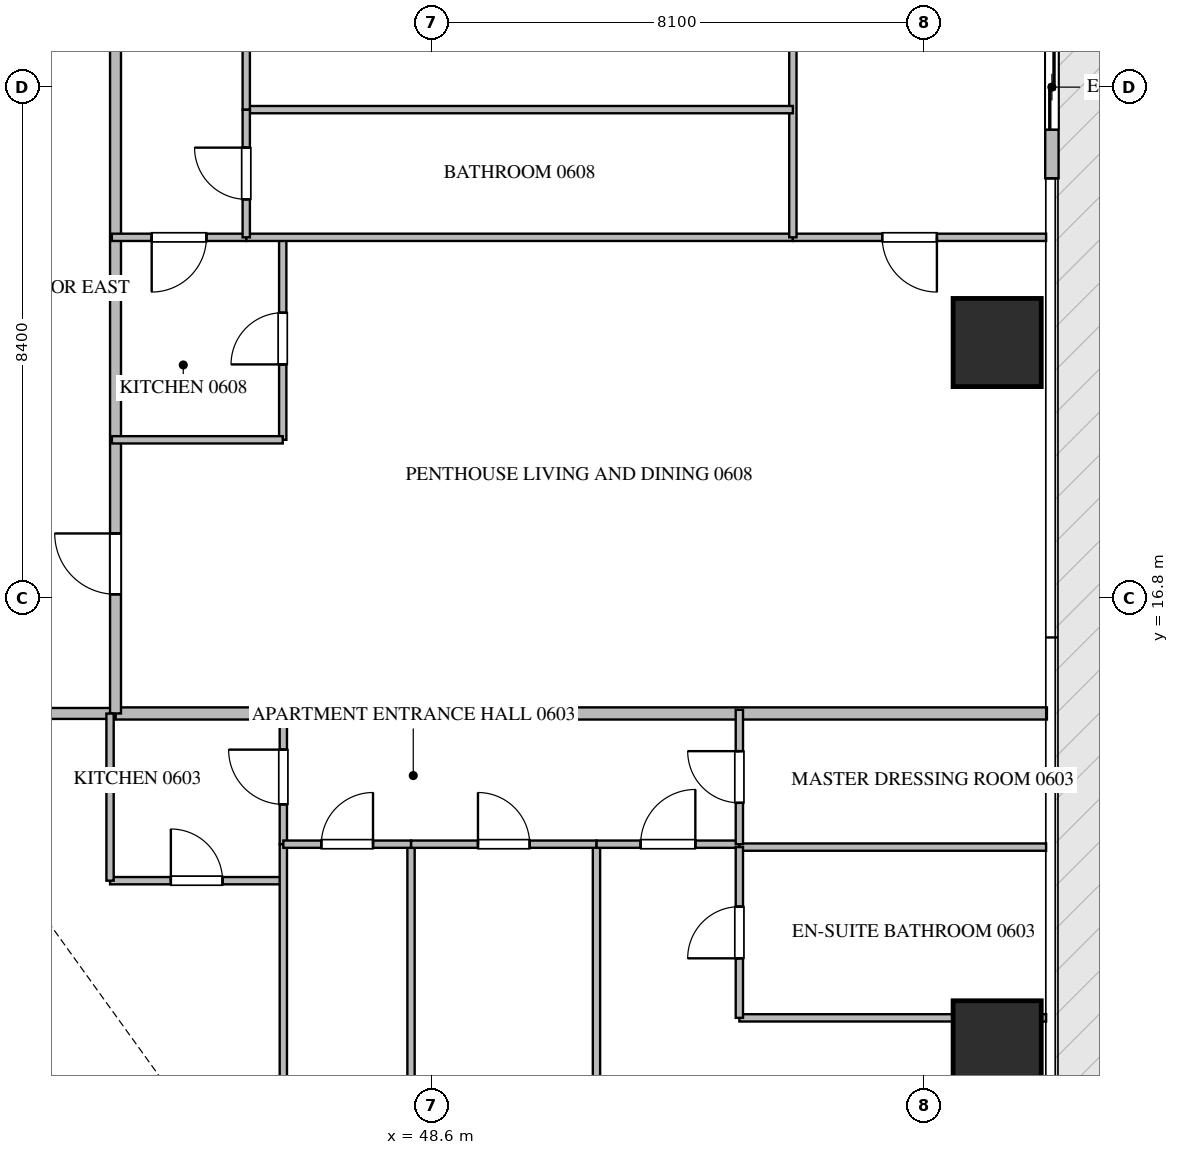
"""IFC4 building model, lengths in metres.
Left out: names, types, materials, properties, quantities, classifications, styles, units other than length and angle.
Written with IfcOpenShell. Run it as: python <this file> out.ifc"""

import sys

from ifc_helpers import new_model, si_unit, direction, frame, frame_2d, origin, origin_2d, place, context, subcontext, project, spatial, rectangle, extrude, source, transform, mapped, element, fill, save


model = new_model("IFC4")
c1 = context("Model", 3, precision=1e-05, world=origin(), true_north=direction((0.0, 1.0)))
c2 = subcontext(c1, "Body", "Model", "MODEL_VIEW")
j1 = project(units=[si_unit("LENGTHUNIT", "METRE"), si_unit("PLANEANGLEUNIT", "RADIAN")], contexts=[c1])
p1 = place(None, origin())
s1 = spatial("IfcSite", under=j1, at=p1, CompositionType="ELEMENT")
p2 = place(p1, origin())
s2 = spatial("IfcBuilding", under=s1, at=p2, CompositionType="ELEMENT")
p3 = place(p2, frame((0.0, 0.0, 30.45)))
s3 = spatial("IfcBuildingStorey", under=s2, at=p3, CompositionType="ELEMENT", Elevation=30.45)
m1 = source(origin(), c2, "Body", "SweptSolid", [
    extrude(rectangle(XDim=1.45, YDim=1.45, at=origin_2d()), origin(), (0.0, 0.0, 1.0), 3.75),
])
for number, where, z_axis, x_axis in (
    (1, (57.9, 9.45, -0.26), (0.0, 0.0, 1.0), (1.0, 0.0, 0.0)),
    (2, (57.9, 21.0, -0.26), (0.0, 0.0, 1.0), (1.0, 0.0, 0.0)),
):
    element("IfcColumn", number, at=place(p3, frame(where, z_axis=z_axis, x_axis=x_axis)), inside=s3, PredefinedType="COLUMN", context=c2, shape_type="MappedRepresentation", body=[
        mapped(m1, transform((0.0, 0.0, 0.0), scale=1.0)),
    ])
p4 = place(p3, frame((58.8, 23.7, 0.0), z_axis=(0.0, 0.0, 1.0), x_axis=(0.0, 1.0, 0.0)))
e3 = element("IfcWall", 3, at=p4, inside=s3, PredefinedType="ELEMENTEDWALL", context=c2, shape_type="SweptSolid", body=[
    extrude(rectangle(XDim=3.0, YDim=0.22, at=frame_2d((1.5, 0.0))), origin(), (0.0, 0.0, 1.0), 3.475),
])
p5 = place(p4, frame((0.8, 0.0, 0.0)))
e4 = element("IfcOpeningElement", 4, at=p5, cuts=e3, PredefinedType="OPENING", context=c2, shape_type="SweptSolid", body=[
    extrude(rectangle(XDim=1.4, YDim=2.25, at=frame_2d((0.7, 1.125))), frame((0.0, 0.12, 0.0), z_axis=(0.0, -1.0, 0.0), x_axis=(1.0, 0.0, 0.0)), (0.0, 0.0, 1.0), 0.24),
])
p6 = place(p3, frame((43.4, 14.9, 0.0), z_axis=(0.0, 0.0, 1.0), x_axis=(1.0, 0.0, 0.0)))
e5 = element("IfcWall", 5, at=p6, inside=s3, PredefinedType="PARTITIONING", context=c2, shape_type="SweptSolid", body=[
    extrude(rectangle(XDim=15.318, YDim=0.2, at=frame_2d((7.659, 0.0))), origin(), (0.0, 0.0, 1.0), 3.49),
])
p7 = place(p3, frame((21.402, 14.9, 0.0), z_axis=(0.0, 0.0, 1.0), x_axis=(1.0, 0.0, 0.0)))
e6 = element("IfcWall", 6, at=p7, inside=s3, PredefinedType="PARTITIONING", context=c2, shape_type="SweptSolid", body=[
    extrude(rectangle(XDim=21.996, YDim=0.18, at=frame_2d((10.998, 0.0))), origin(), (0.0, 0.0, 1.0), 3.49),
])
p8 = place(p7, frame((2.1, 0.0, 0.0)))
e7 = element("IfcOpeningElement", 7, at=p8, cuts=e6, PredefinedType="OPENING", context=c2, shape_type="SweptSolid", body=[
    extrude(rectangle(XDim=1.0, YDim=2.15, at=frame_2d((0.5, 1.075))), frame((0.0, 0.1, 0.0), z_axis=(0.0, -1.0, 0.0), x_axis=(1.0, 0.0, 0.0)), (0.0, 0.0, 1.0), 0.2),
])
p9 = place(p7, frame((6.719, 0.0, 0.0)))
e8 = element("IfcOpeningElement", 8, at=p9, cuts=e6, PredefinedType="OPENING", context=c2, shape_type="SweptSolid", body=[
    extrude(rectangle(XDim=1.0, YDim=2.15, at=frame_2d((0.5, 1.075))), frame((0.0, 0.1, 0.0), z_axis=(0.0, -1.0, 0.0), x_axis=(1.0, 0.0, 0.0)), (0.0, 0.0, 1.0), 0.2),
])
p10 = place(p7, frame((18.896, 0.0, 0.0)))
e9 = element("IfcOpeningElement", 9, at=p10, cuts=e6, PredefinedType="OPENING", context=c2, shape_type="SweptSolid", body=[
    extrude(rectangle(XDim=1.0, YDim=2.15, at=frame_2d((0.5, 1.075))), frame((0.0, 0.1, 0.0), z_axis=(0.0, -1.0, 0.0), x_axis=(1.0, 0.0, 0.0)), (0.0, 0.0, 1.0), 0.2),
])
p11 = place(p3, frame((43.4, 14.9, 0.0), z_axis=(0.0, 0.0, 1.0), x_axis=(0.0, 1.0, 0.0)))
e10 = element("IfcWall", 10, at=p11, inside=s3, PredefinedType="PARTITIONING", context=c2, shape_type="SweptSolid", body=[
    extrude(rectangle(XDim=20.6, YDim=0.18, at=frame_2d((10.3, 0.0))), origin(), (0.0, 0.0, 1.0), 3.49),
])
p12 = place(p11, frame((1.96, 0.0, 0.0)))
e11 = element("IfcOpeningElement", 11, at=p12, cuts=e10, PredefinedType="OPENING", context=c2, shape_type="SweptSolid", body=[
    extrude(rectangle(XDim=1.0, YDim=2.15, at=frame_2d((0.5, 1.075))), frame((0.0, 0.1, 0.0), z_axis=(0.0, -1.0, 0.0), x_axis=(1.0, 0.0, 0.0)), (0.0, 0.0, 1.0), 0.2),
])
p13 = place(p3, frame((43.31, 12.15, 0.0), z_axis=(0.0, 0.0, 1.0), x_axis=(1.0, 0.0, 0.0)))
e12 = element("IfcWall", 12, at=p13, inside=s3, PredefinedType="PARTITIONING", context=c2, shape_type="SweptSolid", body=[
    extrude(rectangle(XDim=2.85, YDim=0.12, at=frame_2d((1.425, 0.0))), origin(), (0.0, 0.0, 1.0), 3.49),
])
p14 = place(p13, frame((1.0, 0.0, 0.0)))
e13 = element("IfcOpeningElement", 13, at=p14, cuts=e12, PredefinedType="OPENING", context=c2, shape_type="SweptSolid", body=[
    extrude(rectangle(XDim=0.85, YDim=2.1, at=frame_2d((0.425, 1.05))), frame((0.0, 0.07, 0.0), z_axis=(0.0, -1.0, 0.0), x_axis=(1.0, 0.0, 0.0)), (0.0, 0.0, 1.0), 0.14),
])
p15 = place(p3, frame((43.31, 12.15, 0.0), z_axis=(0.0, 0.0, 1.0), x_axis=(0.0, 1.0, 0.0)))
e14 = element("IfcWall", 14, at=p15, inside=s3, PredefinedType="PARTITIONING", context=c2, shape_type="SweptSolid", body=[
    extrude(rectangle(XDim=2.748, YDim=0.12, at=frame_2d((1.374, 0.0))), origin(), (0.0, 0.0, 1.0), 3.49),
])
p16 = place(p3, frame((46.16, 12.75, 0.0), z_axis=(0.0, 0.0, 1.0), x_axis=(0.0, 1.0, 0.0)))
e15 = element("IfcWall", 15, at=p16, inside=s3, PredefinedType="PARTITIONING", context=c2, shape_type="SweptSolid", body=[
    extrude(rectangle(XDim=2.21, YDim=0.12, at=frame_2d((1.105, 0.0))), origin(), (0.0, 0.0, 1.0), 3.49),
])
p17 = place(p16, frame((0.655, 0.0, 0.0)))
e16 = element("IfcOpeningElement", 16, at=p17, cuts=e15, PredefinedType="OPENING", context=c2, shape_type="SweptSolid", body=[
    extrude(rectangle(XDim=0.9, YDim=2.1, at=frame_2d((0.45, 1.05))), frame((0.0, 0.07, 0.0), z_axis=(0.0, -1.0, 0.0), x_axis=(1.0, 0.0, 0.0)), (0.0, 0.0, 1.0), 0.14),
])
p18 = place(p3, frame((46.16, 4.99, 0.0), z_axis=(0.0, 0.0, 1.0), x_axis=(0.0, 1.0, 0.0)))
e17 = element("IfcWall", 17, at=p18, inside=s3, PredefinedType="PARTITIONING", context=c2, shape_type="SweptSolid", body=[
    extrude(rectangle(XDim=7.758, YDim=0.12, at=frame_2d((3.879, 0.0))), origin(), (0.0, 0.0, 1.0), 3.49),
])
p19 = place(p3, frame((51.31, 4.495, 0.0), z_axis=(0.0, 0.0, 1.0), x_axis=(0.0, 1.0, 0.0)))
e18 = element("IfcWall", 18, at=p19, inside=s3, PredefinedType="PARTITIONING", context=c2, shape_type="SweptSolid", body=[
    extrude(rectangle(XDim=8.255, YDim=0.12, at=frame_2d((4.127, 0.0))), origin(), (0.0, 0.0, 1.0), 3.49),
])
p20 = place(p3, frame((48.26, 4.988, 0.0), z_axis=(0.0, 0.0, 1.0), x_axis=(0.0, 1.0, 0.0)))
e19 = element("IfcWall", 19, at=p20, inside=s3, PredefinedType="PARTITIONING", context=c2, shape_type="SweptSolid", body=[
    extrude(rectangle(XDim=7.762, YDim=0.12, at=frame_2d((3.881, 0.0))), origin(), (0.0, 0.0, 1.0), 3.49),
])
p21 = place(p3, frame((46.16, 12.75, 0.0), z_axis=(0.0, 0.0, 1.0), x_axis=(1.0, 0.0, 0.0)))
e20 = element("IfcWall", 20, at=p21, inside=s3, PredefinedType="PARTITIONING", context=c2, shape_type="SweptSolid", body=[
    extrude(rectangle(XDim=2.1, YDim=0.12, at=frame_2d((1.05, 0.0))), origin(), (0.0, 0.0, 1.0), 3.49),
])
p22 = place(p21, frame((0.625, 0.0, 0.0)))
e21 = element("IfcOpeningElement", 21, at=p22, cuts=e20, PredefinedType="OPENING", context=c2, shape_type="SweptSolid", body=[
    extrude(rectangle(XDim=0.85, YDim=2.1, at=frame_2d((0.425, 1.05))), frame((0.0, 0.07, 0.0), z_axis=(0.0, -1.0, 0.0), x_axis=(1.0, 0.0, 0.0)), (0.0, 0.0, 1.0), 0.14),
])
p23 = place(p3, frame((48.262, 12.75, 0.0), z_axis=(0.0, 0.0, 1.0), x_axis=(1.0, 0.0, 0.0)))
e22 = element("IfcWall", 22, at=p23, inside=s3, PredefinedType="PARTITIONING", context=c2, shape_type="SweptSolid", body=[
    extrude(rectangle(XDim=3.048, YDim=0.12, at=frame_2d((1.524, 0.0))), origin(), (0.0, 0.0, 1.0), 3.49),
])
p24 = place(p23, frame((1.099, 0.0, 0.0)))
e23 = element("IfcOpeningElement", 23, at=p24, cuts=e22, PredefinedType="OPENING", context=c2, shape_type="SweptSolid", body=[
    extrude(rectangle(XDim=0.85, YDim=2.1, at=frame_2d((0.425, 1.05))), frame((0.0, 0.07, 0.0), z_axis=(0.0, -1.0, 0.0), x_axis=(1.0, 0.0, 0.0)), (0.0, 0.0, 1.0), 0.14),
])
p25 = place(p3, frame((51.312, 12.75, 0.0), z_axis=(0.0, 0.0, 1.0), x_axis=(1.0, 0.0, 0.0)))
e24 = element("IfcWall", 24, at=p25, inside=s3, PredefinedType="PARTITIONING", context=c2, shape_type="SweptSolid", body=[
    extrude(rectangle(XDim=2.348, YDim=0.12, at=frame_2d((1.174, 0.0))), origin(), (0.0, 0.0, 1.0), 3.49),
])
p26 = place(p25, frame((0.724, 0.0, 0.0)))
e25 = element("IfcOpeningElement", 25, at=p26, cuts=e24, PredefinedType="OPENING", context=c2, shape_type="SweptSolid", body=[
    extrude(rectangle(XDim=0.9, YDim=2.1, at=frame_2d((0.45, 1.05))), frame((0.0, 0.07, 0.0), z_axis=(0.0, -1.0, 0.0), x_axis=(1.0, 0.0, 0.0)), (0.0, 0.0, 1.0), 0.14),
])
p27 = place(p3, frame((53.66, 9.894, 0.0), z_axis=(0.0, 0.0, 1.0), x_axis=(1.0, 0.0, 0.0)))
e26 = element("IfcWall", 26, at=p27, inside=s3, PredefinedType="PARTITIONING", context=c2, shape_type="SweptSolid", body=[
    extrude(rectangle(XDim=5.045, YDim=0.12, at=frame_2d((2.522, 0.0))), origin(), (0.0, 0.0, 1.0), 3.49),
])
p28 = place(p3, frame((53.662, 12.702, 0.0), z_axis=(0.0, 0.0, 1.0), x_axis=(1.0, 0.0, 0.0)))
e27 = element("IfcWall", 27, at=p28, inside=s3, PredefinedType="PARTITIONING", context=c2, shape_type="SweptSolid", body=[
    extrude(rectangle(XDim=5.043, YDim=0.12, at=frame_2d((2.521, 0.0))), origin(), (0.0, 0.0, 1.0), 3.49),
])
p29 = place(p3, frame((53.66, 9.894, 0.0), z_axis=(0.0, 0.0, 1.0), x_axis=(0.0, 1.0, 0.0)))
e28 = element("IfcWall", 28, at=p29, inside=s3, PredefinedType="PARTITIONING", context=c2, shape_type="SweptSolid", body=[
    extrude(rectangle(XDim=2.808, YDim=0.12, at=frame_2d((1.404, 0.0))), origin(), (0.0, 0.0, 1.0), 3.49),
])
p30 = place(p29, frame((0.979, 0.0, 0.0)))
e29 = element("IfcOpeningElement", 29, at=p30, cuts=e28, PredefinedType="OPENING", context=c2, shape_type="SweptSolid", body=[
    extrude(rectangle(XDim=0.85, YDim=2.1, at=frame_2d((0.425, 1.05))), frame((0.0, 0.07, 0.0), z_axis=(0.0, -1.0, 0.0), x_axis=(1.0, 0.0, 0.0)), (0.0, 0.0, 1.0), 0.14),
])
p31 = place(p3, frame((53.66, 12.75, 0.0), z_axis=(0.0, 0.0, 1.0), x_axis=(0.0, 1.0, 0.0)))
e30 = element("IfcWall", 30, at=p31, inside=s3, PredefinedType="PARTITIONING", context=c2, shape_type="SweptSolid", body=[
    extrude(rectangle(XDim=2.21, YDim=0.12, at=frame_2d((1.105, 0.0))), origin(), (0.0, 0.0, 1.0), 3.49),
])
p32 = place(p31, frame((0.68, 0.0, 0.0)))
e31 = element("IfcOpeningElement", 31, at=p32, cuts=e30, PredefinedType="OPENING", context=c2, shape_type="SweptSolid", body=[
    extrude(rectangle(XDim=0.85, YDim=2.1, at=frame_2d((0.425, 1.05))), frame((0.0, 0.07, 0.0), z_axis=(0.0, -1.0, 0.0), x_axis=(1.0, 0.0, 0.0)), (0.0, 0.0, 1.0), 0.14),
])
p33 = place(p3, frame((46.15, 19.4, 0.0), z_axis=(0.0, 0.0, 1.0), x_axis=(0.0, 1.0, 0.0)))
e32 = element("IfcWall", 32, at=p33, inside=s3, PredefinedType="PARTITIONING", context=c2, shape_type="SweptSolid", body=[
    extrude(rectangle(XDim=3.33, YDim=0.12, at=frame_2d((1.665, 0.0))), origin(), (0.0, 0.0, 1.0), 3.49),
])
p34 = place(p33, frame((1.24, 0.0, 0.0)))
e33 = element("IfcOpeningElement", 33, at=p34, cuts=e32, PredefinedType="OPENING", context=c2, shape_type="SweptSolid", body=[
    extrude(rectangle(XDim=0.85, YDim=2.1, at=frame_2d((0.425, 1.05))), frame((0.0, 0.07, 0.0), z_axis=(0.0, -1.0, 0.0), x_axis=(1.0, 0.0, 0.0)), (0.0, 0.0, 1.0), 0.14),
])
p35 = place(p3, frame((46.15, 19.4, 0.0), z_axis=(0.0, 0.0, 1.0), x_axis=(-1.0, 0.0, 0.0)))
e34 = element("IfcWall", 34, at=p35, inside=s3, PredefinedType="PARTITIONING", context=c2, shape_type="SweptSolid", body=[
    extrude(rectangle(XDim=2.81, YDim=0.12, at=frame_2d((1.405, 0.0))), origin(), (0.0, 0.0, 1.0), 3.49),
])
p36 = place(p3, frame((45.55, 22.73, 0.0), z_axis=(0.0, 0.0, 1.0), x_axis=(-1.0, 0.0, 0.0)))
e35 = element("IfcWall", 35, at=p36, inside=s3, PredefinedType="PARTITIONING", context=c2, shape_type="SweptSolid", body=[
    extrude(rectangle(XDim=2.21, YDim=0.12, at=frame_2d((1.105, 0.0))), origin(), (0.0, 0.0, 1.0), 3.49),
])
p37 = place(p36, frame((0.655, 0.0, 0.0)))
e36 = element("IfcOpeningElement", 36, at=p37, cuts=e35, PredefinedType="OPENING", context=c2, shape_type="SweptSolid", body=[
    extrude(rectangle(XDim=0.9, YDim=2.1, at=frame_2d((0.45, 1.05))), frame((0.0, 0.07, 0.0), z_axis=(0.0, -1.0, 0.0), x_axis=(1.0, 0.0, 0.0)), (0.0, 0.0, 1.0), 0.14),
])
p38 = place(p3, frame((58.705, 22.73, 0.0), z_axis=(0.0, 0.0, 1.0), x_axis=(-1.0, 0.0, 0.0)))
e37 = element("IfcWall", 37, at=p38, inside=s3, PredefinedType="PARTITIONING", context=c2, shape_type="SweptSolid", body=[
    extrude(rectangle(XDim=4.165, YDim=0.12, at=frame_2d((2.083, 0.0))), origin(), (0.0, 0.0, 1.0), 3.49),
])
p39 = place(p38, frame((1.796, 0.0, 0.0)))
e38 = element("IfcOpeningElement", 38, at=p39, cuts=e37, PredefinedType="OPENING", context=c2, shape_type="SweptSolid", body=[
    extrude(rectangle(XDim=0.9, YDim=2.1, at=frame_2d((0.45, 1.05))), frame((0.0, 0.07, 0.0), z_axis=(0.0, -1.0, 0.0), x_axis=(1.0, 0.0, 0.0)), (0.0, 0.0, 1.0), 0.14),
])
p40 = place(p3, frame((54.538, 22.73, 0.0), z_axis=(0.0, 0.0, 1.0), x_axis=(-1.0, 0.0, 0.0)))
e39 = element("IfcWall", 39, at=p40, inside=s3, PredefinedType="PARTITIONING", context=c2, shape_type="SweptSolid", body=[
    extrude(rectangle(XDim=8.986, YDim=0.12, at=frame_2d((4.493, 0.0))), origin(), (0.0, 0.0, 1.0), 3.49),
])
p41 = place(p3, frame((54.54, 22.73, 0.0), z_axis=(0.0, 0.0, 1.0), x_axis=(0.0, 1.0, 0.0)))
e40 = element("IfcWall", 40, at=p41, inside=s3, PredefinedType="PARTITIONING", context=c2, shape_type="SweptSolid", body=[
    extrude(rectangle(XDim=5.07, YDim=0.12, at=frame_2d((2.535, 0.0))), origin(), (0.0, 0.0, 1.0), 3.49),
])
p42 = place(p3, frame((54.54, 24.83, 0.0), z_axis=(0.0, 0.0, 1.0), x_axis=(-1.0, 0.0, 0.0)))
e41 = element("IfcWall", 41, at=p42, inside=s3, PredefinedType="PARTITIONING", context=c2, shape_type="SweptSolid", body=[
    extrude(rectangle(XDim=8.99, YDim=0.12, at=frame_2d((4.495, 0.0))), origin(), (0.0, 0.0, 1.0), 3.49),
])
p43 = place(p3, frame((45.55, 22.73, 0.0), z_axis=(0.0, 0.0, 1.0), x_axis=(0.0, 1.0, 0.0)))
e42 = element("IfcWall", 42, at=p43, inside=s3, PredefinedType="PARTITIONING", context=c2, shape_type="SweptSolid", body=[
    extrude(rectangle(XDim=2.1, YDim=0.12, at=frame_2d((1.05, 0.0))), origin(), (0.0, 0.0, 1.0), 3.49),
])
p44 = place(p43, frame((0.625, 0.0, 0.0)))
e43 = element("IfcOpeningElement", 43, at=p44, cuts=e42, PredefinedType="OPENING", context=c2, shape_type="SweptSolid", body=[
    extrude(rectangle(XDim=0.85, YDim=2.1, at=frame_2d((0.425, 1.05))), frame((0.0, 0.07, 0.0), z_axis=(0.0, -1.0, 0.0), x_axis=(1.0, 0.0, 0.0)), (0.0, 0.0, 1.0), 0.14),
])
p45 = place(p3, frame((45.55, 24.832, 0.0), z_axis=(0.0, 0.0, 1.0), x_axis=(0.0, 1.0, 0.0)))
e44 = element("IfcWall", 44, at=p45, inside=s3, PredefinedType="PARTITIONING", context=c2, shape_type="SweptSolid", body=[
    extrude(rectangle(XDim=2.968, YDim=0.12, at=frame_2d((1.484, 0.0))), origin(), (0.0, 0.0, 1.0), 3.49),
])
p46 = place(p45, frame((1.059, 0.0, 0.0)))
e45 = element("IfcOpeningElement", 45, at=p46, cuts=e44, PredefinedType="OPENING", context=c2, shape_type="SweptSolid", body=[
    extrude(rectangle(XDim=0.85, YDim=2.1, at=frame_2d((0.425, 1.05))), frame((0.0, 0.07, 0.0), z_axis=(0.0, -1.0, 0.0), x_axis=(1.0, 0.0, 0.0)), (0.0, 0.0, 1.0), 0.14),
])
m2 = source(origin(), c2, "Body", "SweptSolid", [
    extrude(rectangle(XDim=1.4, YDim=2.25, at=frame_2d((0.7, 1.125))), frame((0.0, 0.025, 0.0), z_axis=(0.0, -1.0, 0.0), x_axis=(1.0, 0.0, 0.0)), (0.0, 0.0, 1.0), 0.05),
])
p47 = place(p5, origin())
e46 = element("IfcDoor", 46, at=p47, inside=s3, OperationType="SLIDING_TO_LEFT", PredefinedType="DOOR", context=c2, shape_type="MappedRepresentation", body=[
    mapped(m2, transform((0.0, 0.0, 0.0), scale=1.0)),
])
fill(e4, e46)
m3 = source(origin(), c2, "Body", "SweptSolid", [
    extrude(rectangle(XDim=1.0, YDim=2.15, at=frame_2d((0.5, 1.075))), frame((0.0, 0.025, 0.0), z_axis=(0.0, -1.0, 0.0), x_axis=(1.0, 0.0, 0.0)), (0.0, 0.0, 1.0), 0.05),
])
p48 = place(p12, origin())
e47 = element("IfcDoor", 47, at=p48, inside=s3, OperationType="SINGLE_SWING_RIGHT", PredefinedType="DOOR", context=c2, shape_type="MappedRepresentation", body=[
    mapped(m3, transform((0.0, 0.0, 0.0), scale=1.0)),
])
fill(e11, e47)
m4 = source(origin(), c2, "Body", "SweptSolid", [
    extrude(rectangle(XDim=0.85, YDim=2.1, at=frame_2d((0.425, 1.05))), frame((0.0, 0.025, 0.0), z_axis=(0.0, -1.0, 0.0), x_axis=(1.0, 0.0, 0.0)), (0.0, 0.0, 1.0), 0.05),
])
p49 = place(p14, origin())
e48 = element("IfcDoor", 48, at=p49, inside=s3, OperationType="SINGLE_SWING_LEFT", PredefinedType="DOOR", context=c2, shape_type="MappedRepresentation", body=[
    mapped(m4, transform((0.0, 0.0, 0.0), scale=1.0)),
])
fill(e13, e48)
m5 = source(origin(), c2, "Body", "SweptSolid", [
    extrude(rectangle(XDim=0.9, YDim=2.1, at=frame_2d((0.45, 1.05))), frame((0.0, 0.025, 0.0), z_axis=(0.0, -1.0, 0.0), x_axis=(1.0, 0.0, 0.0)), (0.0, 0.0, 1.0), 0.05),
])
p50 = place(p17, origin())
e49 = element("IfcDoor", 49, at=p50, inside=s3, OperationType="SINGLE_SWING_RIGHT", PredefinedType="DOOR", context=c2, shape_type="MappedRepresentation", body=[
    mapped(m5, transform((0.0, 0.0, 0.0), scale=1.0)),
])
fill(e16, e49)
p51 = place(p22, origin())
e50 = element("IfcDoor", 50, at=p51, inside=s3, OperationType="SINGLE_SWING_RIGHT", PredefinedType="DOOR", context=c2, shape_type="MappedRepresentation", body=[
    mapped(m4, transform((0.0, 0.0, 0.0), scale=1.0)),
])
fill(e21, e50)
p52 = place(p24, origin())
e51 = element("IfcDoor", 51, at=p52, inside=s3, OperationType="SINGLE_SWING_LEFT", PredefinedType="DOOR", context=c2, shape_type="MappedRepresentation", body=[
    mapped(m4, transform((0.0, 0.0, 0.0), scale=1.0)),
])
fill(e23, e51)
p53 = place(p26, origin())
e52 = element("IfcDoor", 52, at=p53, inside=s3, OperationType="SINGLE_SWING_RIGHT", PredefinedType="DOOR", context=c2, shape_type="MappedRepresentation", body=[
    mapped(m5, transform((0.0, 0.0, 0.0), scale=1.0)),
])
fill(e25, e52)
p54 = place(p30, origin())
e53 = element("IfcDoor", 53, at=p54, inside=s3, OperationType="SINGLE_SWING_LEFT", PredefinedType="DOOR", context=c2, shape_type="MappedRepresentation", body=[
    mapped(m4, transform((0.0, 0.0, 0.0), scale=1.0)),
])
fill(e29, e53)
p55 = place(p32, origin())
e54 = element("IfcDoor", 54, at=p55, inside=s3, OperationType="SINGLE_SWING_RIGHT", PredefinedType="DOOR", context=c2, shape_type="MappedRepresentation", body=[
    mapped(m4, transform((0.0, 0.0, 0.0), scale=1.0)),
])
fill(e31, e54)
p56 = place(p34, origin())
e55 = element("IfcDoor", 55, at=p56, inside=s3, OperationType="SINGLE_SWING_LEFT", PredefinedType="DOOR", context=c2, shape_type="MappedRepresentation", body=[
    mapped(m4, transform((0.0, 0.0, 0.0), scale=1.0)),
])
fill(e33, e55)
p57 = place(p37, origin())
e56 = element("IfcDoor", 56, at=p57, inside=s3, OperationType="SINGLE_SWING_RIGHT", PredefinedType="DOOR", context=c2, shape_type="MappedRepresentation", body=[
    mapped(m5, transform((0.0, 0.0, 0.0), scale=1.0)),
])
fill(e36, e56)
p58 = place(p39, origin())
e57 = element("IfcDoor", 57, at=p58, inside=s3, OperationType="SINGLE_SWING_LEFT", PredefinedType="DOOR", context=c2, shape_type="MappedRepresentation", body=[
    mapped(m5, transform((0.0, 0.0, 0.0), scale=1.0)),
])
fill(e38, e57)
p59 = place(p44, origin())
e58 = element("IfcDoor", 58, at=p59, inside=s3, OperationType="SINGLE_SWING_RIGHT", PredefinedType="DOOR", context=c2, shape_type="MappedRepresentation", body=[
    mapped(m4, transform((0.0, 0.0, 0.0), scale=1.0)),
])
fill(e43, e58)
save(model, sys.argv[1])
